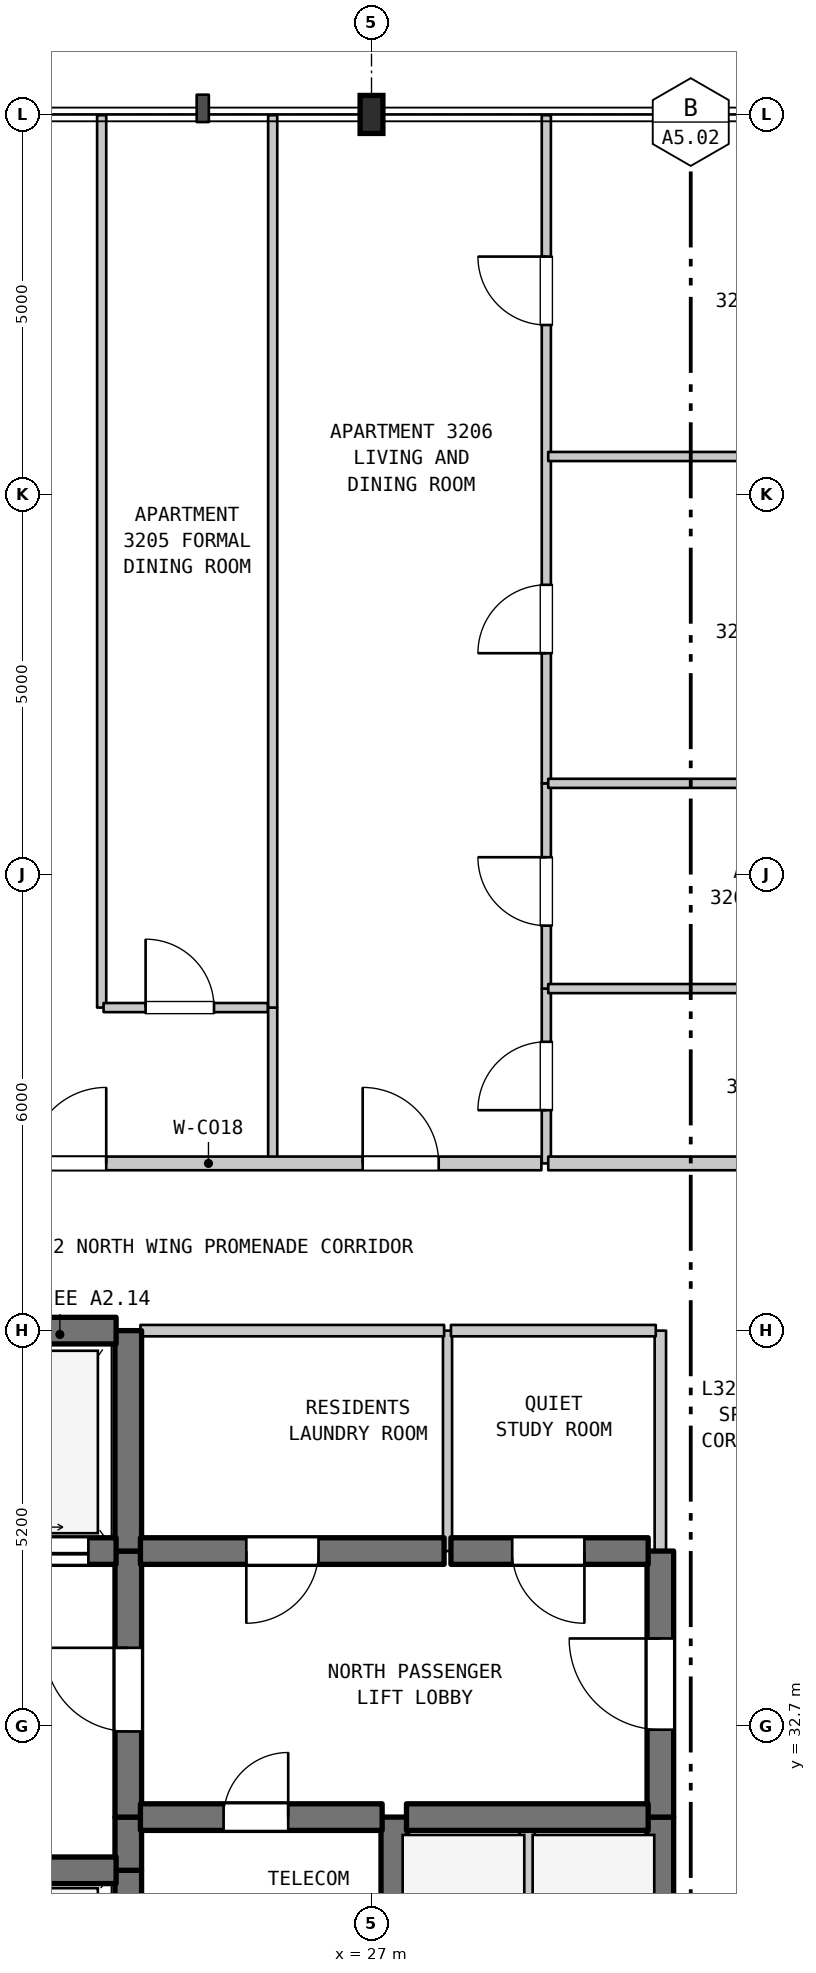
"""IFC4 building model, lengths in metres.
Left out: names, types, materials, properties, quantities, classifications, styles, units other than length and angle.
Written with IfcOpenShell. Run it as: python <this file> out.ifc"""

import sys

from ifc_helpers import new_model, si_unit, direction, frame, frame_2d, origin, origin_2d, place, context, subcontext, project, spatial, rectangle, i_section, extrude, element, fill, save


model = new_model("IFC4")
c1 = context("Model", 3, precision=1e-05, world=origin(), true_north=direction((0.0, 1.0)))
c2 = subcontext(c1, "Body", "Model", "MODEL_VIEW")
j1 = project(units=[si_unit("LENGTHUNIT", "METRE"), si_unit("PLANEANGLEUNIT", "RADIAN")], contexts=[c1])
p1 = place(None, origin())
s1 = spatial("IfcSite", under=j1, at=p1, CompositionType="ELEMENT")
p2 = place(p1, origin())
s2 = spatial("IfcBuilding", under=s1, at=p2, CompositionType="ELEMENT")
p3 = place(p2, frame((0.0, 0.0, 133.5)))
s3 = spatial("IfcBuildingStorey", under=s2, at=p3, CompositionType="ELEMENT", Elevation=133.5)
p4 = place(p3, frame((27.0, 53.9, 0.0), z_axis=(0.0, 0.0, 1.0), x_axis=(1.0, 0.0, 0.0)))
e1 = element("IfcColumn", 1, at=p4, inside=s3, PredefinedType="COLUMN", context=c2, shape_type="SweptSolid", body=[
    extrude(i_section(OverallWidth=0.3, OverallDepth=0.5, WebThickness=0.014, FlangeThickness=0.028, FilletRadius=0.027, at=origin_2d()), origin(), (0.0, 0.0, 1.0), 3.7),
])
p5 = place(p3, frame((23.45, 42.15, 0.0), z_axis=(0.0, 0.0, 1.0), x_axis=(0.0, 1.0, 0.0)))
e2 = element("IfcWall", 2, at=p5, inside=s3, PredefinedType="PARTITIONING", context=c2, shape_type="SweptSolid", body=[
    extrude(rectangle(XDim=11.74, YDim=0.12, at=frame_2d((5.87, 0.0))), origin(), (0.0, 0.0, 1.0), 3.385),
])
p6 = place(p3, frame((23.8, 29.5, 0.0), z_axis=(0.0, 0.0, 1.0), x_axis=(0.0, 1.0, 0.0)))
e3 = element("IfcWall", 3, at=p6, inside=s3, PredefinedType="SHEAR", context=c2, shape_type="SweptSolid", body=[
    extrude(rectangle(XDim=1.3, YDim=0.35, at=frame_2d((0.65, 0.0))), origin(), (0.0, 0.0, 1.0), 3.385),
])
p7 = place(p3, frame((23.8, 30.8, 0.0), z_axis=(0.0, 0.0, 1.0), x_axis=(0.0, 1.0, 0.0)))
e4 = element("IfcWall", 4, at=p7, inside=s3, PredefinedType="SHEAR", context=c2, shape_type="SweptSolid", body=[
    extrude(rectangle(XDim=0.7, YDim=0.35, at=frame_2d((0.35, 0.0))), origin(), (0.0, 0.0, 1.0), 3.385),
])
p8 = place(p3, frame((23.8, 31.5, 0.0), z_axis=(0.0, 0.0, 1.0), x_axis=(0.0, 1.0, 0.0)))
e5 = element("IfcWall", 5, at=p8, inside=s3, PredefinedType="SHEAR", context=c2, shape_type="SweptSolid", body=[
    extrude(rectangle(XDim=3.5, YDim=0.35, at=frame_2d((1.75, 0.0))), origin(), (0.0, 0.0, 1.0), 3.385),
])
p9 = place(p8, frame((1.127, 0.0, 0.0)))
e6 = element("IfcOpeningElement", 6, at=p9, cuts=e5, PredefinedType="OPENING", context=c2, shape_type="SweptSolid", body=[
    extrude(rectangle(XDim=1.1, YDim=2.15, at=frame_2d((0.55, 1.075))), frame((0.0, 0.185, 0.0), z_axis=(0.0, -1.0, 0.0), x_axis=(1.0, 0.0, 0.0)), (0.0, 0.0, 1.0), 0.37),
])
p10 = place(p3, frame((23.8, 35.0, 0.0), z_axis=(0.0, 0.0, 1.0), x_axis=(0.0, 1.0, 0.0)))
e7 = element("IfcWall", 7, at=p10, inside=s3, PredefinedType="SHEAR", context=c2, shape_type="SweptSolid", body=[
    extrude(rectangle(XDim=2.9, YDim=0.35, at=frame_2d((1.45, 0.0))), origin(), (0.0, 0.0, 1.0), 3.385),
])
p11 = place(p3, frame((25.7, 40.1, 0.0), z_axis=(0.0, 0.0, 1.0), x_axis=(0.0, 1.0, 0.0)))
e8 = element("IfcWall", 8, at=p11, inside=s3, PredefinedType="PARTITIONING", context=c2, shape_type="SweptSolid", body=[
    extrude(rectangle(XDim=2.05, YDim=0.12, at=frame_2d((1.025, 0.0))), origin(), (0.0, 0.0, 1.0), 3.385),
])
p12 = place(p3, frame((25.7, 42.15, 0.0), z_axis=(0.0, 0.0, 1.0), x_axis=(0.0, 1.0, 0.0)))
e9 = element("IfcWall", 9, at=p12, inside=s3, PredefinedType="PARTITIONING", context=c2, shape_type="SweptSolid", body=[
    extrude(rectangle(XDim=11.74, YDim=0.12, at=frame_2d((5.87, 0.0))), origin(), (0.0, 0.0, 1.0), 3.385),
])
p13 = place(p3, frame((27.3, 29.5, 0.0), z_axis=(0.0, 0.0, 1.0), x_axis=(0.0, 1.0, 0.0)))
e10 = element("IfcWall", 10, at=p13, inside=s3, PredefinedType="SHEAR", context=c2, shape_type="SweptSolid", body=[
    extrude(rectangle(XDim=2.0, YDim=0.35, at=frame_2d((1.0, 0.0))), origin(), (0.0, 0.0, 1.0), 3.385),
])
p14 = place(p3, frame((28.0, 35.0, 0.0), z_axis=(0.0, 0.0, 1.0), x_axis=(0.0, 1.0, 0.0)))
e11 = element("IfcWall", 11, at=p14, inside=s3, PredefinedType="PARTITIONING", context=c2, shape_type="SweptSolid", body=[
    extrude(rectangle(XDim=2.9, YDim=0.12, at=frame_2d((1.45, 0.0))), origin(), (0.0, 0.0, 1.0), 3.385),
])
p15 = place(p3, frame((29.05, 28.9, 0.0), z_axis=(0.0, 0.0, 1.0), x_axis=(0.0, 1.0, 0.0)))
e12 = element("IfcWall", 12, at=p15, inside=s3, PredefinedType="STANDARD", context=c2, shape_type="SweptSolid", body=[
    extrude(rectangle(XDim=2.6, YDim=0.2, at=frame_2d((1.3, 0.0))), origin(), (0.0, 0.0, 1.0), 3.385),
])
p16 = place(p3, frame((29.3, 40.1, 0.0), z_axis=(0.0, 0.0, 1.0), x_axis=(0.0, 1.0, 0.0)))
e13 = element("IfcWall", 13, at=p16, inside=s3, PredefinedType="PARTITIONING", context=c2, shape_type="SweptSolid", body=[
    extrude(rectangle(XDim=2.3, YDim=0.12, at=frame_2d((1.15, 0.0))), origin(), (0.0, 0.0, 1.0), 3.385),
])
p17 = place(p16, frame((0.7, 0.0, 0.0)))
e14 = element("IfcOpeningElement", 14, at=p17, cuts=e13, PredefinedType="OPENING", context=c2, shape_type="SweptSolid", body=[
    extrude(rectangle(XDim=0.9, YDim=2.15, at=frame_2d((0.45, 1.075))), frame((0.0, 0.07, 0.0), z_axis=(0.0, -1.0, 0.0), x_axis=(1.0, 0.0, 0.0)), (0.0, 0.0, 1.0), 0.14),
])
p18 = place(p3, frame((29.3, 42.4, 0.0), z_axis=(0.0, 0.0, 1.0), x_axis=(0.0, 1.0, 0.0)))
e15 = element("IfcWall", 15, at=p18, inside=s3, PredefinedType="PARTITIONING", context=c2, shape_type="SweptSolid", body=[
    extrude(rectangle(XDim=2.7, YDim=0.12, at=frame_2d((1.35, 0.0))), origin(), (0.0, 0.0, 1.0), 3.385),
])
p19 = place(p18, frame((0.828, 0.0, 0.0)))
e16 = element("IfcOpeningElement", 16, at=p19, cuts=e15, PredefinedType="OPENING", context=c2, shape_type="SweptSolid", body=[
    extrude(rectangle(XDim=0.9, YDim=2.1, at=frame_2d((0.45, 1.05))), frame((0.0, 0.07, 0.0), z_axis=(0.0, -1.0, 0.0), x_axis=(1.0, 0.0, 0.0)), (0.0, 0.0, 1.0), 0.14),
])
p20 = place(p3, frame((29.3, 45.1, 0.0), z_axis=(0.0, 0.0, 1.0), x_axis=(0.0, 1.0, 0.0)))
e17 = element("IfcWall", 17, at=p20, inside=s3, PredefinedType="PARTITIONING", context=c2, shape_type="SweptSolid", body=[
    extrude(rectangle(XDim=8.79, YDim=0.12, at=frame_2d((4.395, 0.0))), origin(), (0.0, 0.0, 1.0), 3.385),
])
p21 = place(p20, frame((1.712, 0.0, 0.0)))
e18 = element("IfcOpeningElement", 18, at=p21, cuts=e17, PredefinedType="OPENING", context=c2, shape_type="SweptSolid", body=[
    extrude(rectangle(XDim=0.9, YDim=2.15, at=frame_2d((0.45, 1.075))), frame((0.0, 0.07, 0.0), z_axis=(0.0, -1.0, 0.0), x_axis=(1.0, 0.0, 0.0)), (0.0, 0.0, 1.0), 0.14),
])
p22 = place(p20, frame((6.03, 0.0, 0.0)))
e19 = element("IfcOpeningElement", 19, at=p22, cuts=e17, PredefinedType="OPENING", context=c2, shape_type="SweptSolid", body=[
    extrude(rectangle(XDim=0.9, YDim=2.15, at=frame_2d((0.45, 1.075))), frame((0.0, 0.07, 0.0), z_axis=(0.0, -1.0, 0.0), x_axis=(1.0, 0.0, 0.0)), (0.0, 0.0, 1.0), 0.14),
])
p23 = place(p3, frame((30.8, 28.9, 0.0), z_axis=(0.0, 0.0, 1.0), x_axis=(0.0, 1.0, 0.0)))
e20 = element("IfcWall", 20, at=p23, inside=s3, PredefinedType="SHEAR", context=c2, shape_type="SweptSolid", body=[
    extrude(rectangle(XDim=2.6, YDim=0.35, at=frame_2d((1.3, 0.0))), origin(), (0.0, 0.0, 1.0), 3.385),
])
p24 = place(p3, frame((30.8, 31.5, 0.0), z_axis=(0.0, 0.0, 1.0), x_axis=(0.0, 1.0, 0.0)))
e21 = element("IfcWall", 21, at=p24, inside=s3, PredefinedType="SHEAR", context=c2, shape_type="SweptSolid", body=[
    extrude(rectangle(XDim=3.5, YDim=0.35, at=frame_2d((1.75, 0.0))), origin(), (0.0, 0.0, 1.0), 3.385),
])
p25 = place(p24, frame((1.15, 0.0, 0.0)))
e22 = element("IfcOpeningElement", 22, at=p25, cuts=e21, PredefinedType="OPENING", context=c2, shape_type="SweptSolid", body=[
    extrude(rectangle(XDim=1.2, YDim=2.2, at=frame_2d((0.6, 1.1))), frame((0.0, 0.185, 0.0), z_axis=(0.0, -1.0, 0.0), x_axis=(1.0, 0.0, 0.0)), (0.0, 0.0, 1.0), 0.37),
])
p26 = place(p3, frame((30.8, 35.0, 0.0), z_axis=(0.0, 0.0, 1.0), x_axis=(0.0, 1.0, 0.0)))
e23 = element("IfcWall", 23, at=p26, inside=s3, PredefinedType="STANDARD", context=c2, shape_type="SweptSolid", body=[
    extrude(rectangle(XDim=2.9, YDim=0.15, at=frame_2d((1.45, 0.0))), origin(), (0.0, 0.0, 1.0), 3.385),
])
p27 = place(p3, frame((19.16, 30.8, 0.0), z_axis=(0.0, 0.0, 1.0), x_axis=(1.0, 0.0, 0.0)))
e24 = element("IfcWall", 24, at=p27, inside=s3, PredefinedType="SHEAR", context=c2, shape_type="SweptSolid", body=[
    extrude(rectangle(XDim=4.48, YDim=0.35, at=frame_2d((2.24, 0.0))), origin(), (0.0, 0.0, 1.0), 3.385),
])
p28 = place(p3, frame((23.96, 31.5, 0.0), z_axis=(0.0, 0.0, 1.0), x_axis=(1.0, 0.0, 0.0)))
e25 = element("IfcWall", 25, at=p28, inside=s3, PredefinedType="SHEAR", context=c2, shape_type="SweptSolid", body=[
    extrude(rectangle(XDim=3.18, YDim=0.35, at=frame_2d((1.59, 0.0))), origin(), (0.0, 0.0, 1.0), 3.385),
])
p29 = place(p28, frame((1.094, 0.0, 0.0)))
e26 = element("IfcOpeningElement", 26, at=p29, cuts=e25, PredefinedType="OPENING", context=c2, shape_type="SweptSolid", body=[
    extrude(rectangle(XDim=0.85, YDim=2.1, at=frame_2d((0.425, 1.05))), frame((0.0, 0.185, 0.0), z_axis=(0.0, -1.0, 0.0), x_axis=(1.0, 0.0, 0.0)), (0.0, 0.0, 1.0), 0.37),
])
p30 = place(p3, frame((27.46, 31.5, 0.0), z_axis=(0.0, 0.0, 1.0), x_axis=(1.0, 0.0, 0.0)))
e27 = element("IfcWall", 27, at=p30, inside=s3, PredefinedType="SHEAR", context=c2, shape_type="SweptSolid", body=[
    extrude(rectangle(XDim=3.18, YDim=0.35, at=frame_2d((1.59, 0.0))), origin(), (0.0, 0.0, 1.0), 3.385),
])
p31 = place(p3, frame((19.16, 35.0, 0.0), z_axis=(0.0, 0.0, 1.0), x_axis=(1.0, 0.0, 0.0)))
e28 = element("IfcWall", 28, at=p31, inside=s3, PredefinedType="SHEAR", context=c2, shape_type="SweptSolid", body=[
    extrude(rectangle(XDim=4.48, YDim=0.35, at=frame_2d((2.24, 0.0))), origin(), (0.0, 0.0, 1.0), 3.385),
])
p32 = place(p31, frame((0.365, 0.0, 0.0)))
e29 = element("IfcOpeningElement", 29, at=p32, cuts=e28, PredefinedType="OPENING", context=c2, shape_type="SweptSolid", body=[
    extrude(rectangle(XDim=1.35, YDim=2.2, at=frame_2d((0.675, 1.1))), frame((0.0, 0.185, 0.0), z_axis=(0.0, -1.0, 0.0), x_axis=(1.0, 0.0, 0.0)), (0.0, 0.0, 1.0), 0.37),
])
p33 = place(p31, frame((2.765, 0.0, 0.0)))
e30 = element("IfcOpeningElement", 30, at=p33, cuts=e28, PredefinedType="OPENING", context=c2, shape_type="SweptSolid", body=[
    extrude(rectangle(XDim=1.35, YDim=2.2, at=frame_2d((0.675, 1.1))), frame((0.0, 0.185, 0.0), z_axis=(0.0, -1.0, 0.0), x_axis=(1.0, 0.0, 0.0)), (0.0, 0.0, 1.0), 0.37),
])
p34 = place(p3, frame((23.96, 35.0, 0.0), z_axis=(0.0, 0.0, 1.0), x_axis=(1.0, 0.0, 0.0)))
e31 = element("IfcWall", 31, at=p34, inside=s3, PredefinedType="SHEAR", context=c2, shape_type="SweptSolid", body=[
    extrude(rectangle(XDim=3.995, YDim=0.35, at=frame_2d((1.998, 0.0))), origin(), (0.0, 0.0, 1.0), 3.385),
])
p35 = place(p34, frame((1.393, 0.0, 0.0)))
e32 = element("IfcOpeningElement", 32, at=p35, cuts=e31, PredefinedType="OPENING", context=c2, shape_type="SweptSolid", body=[
    extrude(rectangle(XDim=0.95, YDim=2.15, at=frame_2d((0.475, 1.075))), frame((0.0, 0.185, 0.0), z_axis=(0.0, -1.0, 0.0), x_axis=(1.0, 0.0, 0.0)), (0.0, 0.0, 1.0), 0.37),
])
p36 = place(p3, frame((28.045, 35.0, 0.0), z_axis=(0.0, 0.0, 1.0), x_axis=(1.0, 0.0, 0.0)))
e33 = element("IfcWall", 33, at=p36, inside=s3, PredefinedType="SHEAR", context=c2, shape_type="SweptSolid", body=[
    extrude(rectangle(XDim=2.595, YDim=0.35, at=frame_2d((1.297, 0.0))), origin(), (0.0, 0.0, 1.0), 3.385),
])
p37 = place(p36, frame((0.806, 0.0, 0.0)))
e34 = element("IfcOpeningElement", 34, at=p37, cuts=e33, PredefinedType="OPENING", context=c2, shape_type="SweptSolid", body=[
    extrude(rectangle(XDim=0.95, YDim=2.15, at=frame_2d((0.475, 1.075))), frame((0.0, 0.185, 0.0), z_axis=(0.0, -1.0, 0.0), x_axis=(1.0, 0.0, 0.0)), (0.0, 0.0, 1.0), 0.37),
])
p38 = place(p3, frame((19.16, 37.9, 0.0), z_axis=(0.0, 0.0, 1.0), x_axis=(1.0, 0.0, 0.0)))
e35 = element("IfcWall", 35, at=p38, inside=s3, PredefinedType="SHEAR", context=c2, shape_type="SweptSolid", body=[
    extrude(rectangle(XDim=4.48, YDim=0.35, at=frame_2d((2.24, 0.0))), origin(), (0.0, 0.0, 1.0), 3.385),
])
p39 = place(p3, frame((23.96, 37.9, 0.0), z_axis=(0.0, 0.0, 1.0), x_axis=(1.0, 0.0, 0.0)))
e36 = element("IfcWall", 36, at=p39, inside=s3, PredefinedType="STANDARD", context=c2, shape_type="SweptSolid", body=[
    extrude(rectangle(XDim=3.995, YDim=0.15, at=frame_2d((1.998, 0.0))), origin(), (0.0, 0.0, 1.0), 2.885),
])
p40 = place(p3, frame((28.045, 37.9, 0.0), z_axis=(0.0, 0.0, 1.0), x_axis=(1.0, 0.0, 0.0)))
e37 = element("IfcWall", 37, at=p40, inside=s3, PredefinedType="STANDARD", context=c2, shape_type="SweptSolid", body=[
    extrude(rectangle(XDim=2.695, YDim=0.15, at=frame_2d((1.348, 0.0))), origin(), (0.0, 0.0, 1.0), 2.885),
])
p41 = place(p3, frame((20.475, 40.1, 0.0), z_axis=(0.0, 0.0, 1.0), x_axis=(1.0, 0.0, 0.0)))
e38 = element("IfcWall", 38, at=p41, inside=s3, PredefinedType="STANDARD", context=c2, shape_type="SweptSolid", body=[
    extrude(rectangle(XDim=8.76, YDim=0.18, at=frame_2d((4.38, 0.0))), origin(), (0.0, 0.0, 1.0), 3.385),
])
p42 = place(p41, frame((2.035, 0.0, 0.0)))
e39 = element("IfcOpeningElement", 39, at=p42, cuts=e38, PredefinedType="OPENING", context=c2, shape_type="SweptSolid", body=[
    extrude(rectangle(XDim=1.0, YDim=2.15, at=frame_2d((0.5, 1.075))), frame((0.0, 0.1, 0.0), z_axis=(0.0, -1.0, 0.0), x_axis=(1.0, 0.0, 0.0)), (0.0, 0.0, 1.0), 0.2),
])
p43 = place(p41, frame((6.409, 0.0, 0.0)))
e40 = element("IfcOpeningElement", 40, at=p43, cuts=e38, PredefinedType="OPENING", context=c2, shape_type="SweptSolid", body=[
    extrude(rectangle(XDim=1.0, YDim=2.15, at=frame_2d((0.5, 1.075))), frame((0.0, 0.1, 0.0), z_axis=(0.0, -1.0, 0.0), x_axis=(1.0, 0.0, 0.0)), (0.0, 0.0, 1.0), 0.2),
])
p44 = place(p3, frame((29.325, 40.1, 0.0), z_axis=(0.0, 0.0, 1.0), x_axis=(1.0, 0.0, 0.0)))
e41 = element("IfcWall", 41, at=p44, inside=s3, PredefinedType="STANDARD", context=c2, shape_type="SweptSolid", body=[
    extrude(rectangle(XDim=6.02, YDim=0.18, at=frame_2d((3.01, 0.0))), origin(), (0.0, 0.0, 1.0), 3.385),
])
p45 = place(p3, frame((23.475, 42.15, 0.0), z_axis=(0.0, 0.0, 1.0), x_axis=(1.0, 0.0, 0.0)))
e42 = element("IfcWall", 42, at=p45, inside=s3, PredefinedType="PARTITIONING", context=c2, shape_type="SweptSolid", body=[
    extrude(rectangle(XDim=2.16, YDim=0.12, at=frame_2d((1.08, 0.0))), origin(), (0.0, 0.0, 1.0), 3.385),
])
p46 = place(p45, frame((0.553, 0.0, 0.0)))
e43 = element("IfcOpeningElement", 43, at=p46, cuts=e42, PredefinedType="OPENING", context=c2, shape_type="SweptSolid", body=[
    extrude(rectangle(XDim=0.9, YDim=2.15, at=frame_2d((0.45, 1.075))), frame((0.0, 0.07, 0.0), z_axis=(0.0, -1.0, 0.0), x_axis=(1.0, 0.0, 0.0)), (0.0, 0.0, 1.0), 0.14),
])
for number, where, z_axis, x_axis in (
    (44, (29.325, 42.4, 0.0), (0.0, 0.0, 1.0), (1.0, 0.0, 0.0)),
    (45, (29.325, 45.1, 0.0), (0.0, 0.0, 1.0), (1.0, 0.0, 0.0)),
    (46, (29.325, 49.4, 0.0), (0.0, 0.0, 1.0), (1.0, 0.0, 0.0)),
):
    element("IfcWall", number, at=place(p3, frame(where, z_axis=z_axis, x_axis=x_axis)), inside=s3, PredefinedType="PARTITIONING", context=c2, shape_type="SweptSolid", body=[
        extrude(rectangle(XDim=6.02, YDim=0.12, at=frame_2d((3.01, 0.0))), origin(), (0.0, 0.0, 1.0), 3.385),
    ])
p47 = place(p9, origin())
e47 = element("IfcDoor", 47, at=p47, inside=s3, OperationType="SINGLE_SWING_RIGHT", PredefinedType="DOOR", context=c2, shape_type="SweptSolid", body=[
    extrude(rectangle(XDim=1.1, YDim=2.15, at=frame_2d((0.55, 1.075))), frame((0.0, 0.025, 0.0), z_axis=(0.0, -1.0, 0.0), x_axis=(1.0, 0.0, 0.0)), (0.0, 0.0, 1.0), 0.05),
])
fill(e6, e47)
p48 = place(p17, origin())
e48 = element("IfcDoor", 48, at=p48, inside=s3, OperationType="SINGLE_SWING_LEFT", PredefinedType="DOOR", context=c2, shape_type="SweptSolid", body=[
    extrude(rectangle(XDim=0.9, YDim=2.15, at=frame_2d((0.45, 1.075))), frame((0.0, 0.025, 0.0), z_axis=(0.0, -1.0, 0.0), x_axis=(1.0, 0.0, 0.0)), (0.0, 0.0, 1.0), 0.05),
])
fill(e14, e48)
p49 = place(p19, origin())
e49 = element("IfcDoor", 49, at=p49, inside=s3, OperationType="SINGLE_SWING_RIGHT", PredefinedType="DOOR", context=c2, shape_type="SweptSolid", body=[
    extrude(rectangle(XDim=0.9, YDim=2.1, at=frame_2d((0.45, 1.05))), frame((0.0, 0.025, 0.0), z_axis=(0.0, -1.0, 0.0), x_axis=(1.0, 0.0, 0.0)), (0.0, 0.0, 1.0), 0.05),
])
fill(e16, e49)
p50 = place(p21, origin())
e50 = element("IfcDoor", 50, at=p50, inside=s3, OperationType="SINGLE_SWING_LEFT", PredefinedType="DOOR", context=c2, shape_type="SweptSolid", body=[
    extrude(rectangle(XDim=0.9, YDim=2.15, at=frame_2d((0.45, 1.075))), frame((0.0, 0.025, 0.0), z_axis=(0.0, -1.0, 0.0), x_axis=(1.0, 0.0, 0.0)), (0.0, 0.0, 1.0), 0.05),
])
fill(e18, e50)
p51 = place(p22, origin())
e51 = element("IfcDoor", 51, at=p51, inside=s3, OperationType="SINGLE_SWING_RIGHT", PredefinedType="DOOR", context=c2, shape_type="SweptSolid", body=[
    extrude(rectangle(XDim=0.9, YDim=2.15, at=frame_2d((0.45, 1.075))), frame((0.0, 0.025, 0.0), z_axis=(0.0, -1.0, 0.0), x_axis=(1.0, 0.0, 0.0)), (0.0, 0.0, 1.0), 0.05),
])
fill(e19, e51)
p52 = place(p25, origin())
e52 = element("IfcDoor", 52, at=p52, inside=s3, OperationType="SINGLE_SWING_RIGHT", PredefinedType="DOOR", context=c2, shape_type="SweptSolid", body=[
    extrude(rectangle(XDim=1.2, YDim=2.2, at=frame_2d((0.6, 1.1))), frame((0.0, 0.025, 0.0), z_axis=(0.0, -1.0, 0.0), x_axis=(1.0, 0.0, 0.0)), (0.0, 0.0, 1.0), 0.05),
])
fill(e22, e52)
p53 = place(p29, origin())
e53 = element("IfcDoor", 53, at=p53, inside=s3, OperationType="SINGLE_SWING_RIGHT", PredefinedType="DOOR", context=c2, shape_type="SweptSolid", body=[
    extrude(rectangle(XDim=0.85, YDim=2.1, at=frame_2d((0.425, 1.05))), frame((0.0, 0.025, 0.0), z_axis=(0.0, -1.0, 0.0), x_axis=(1.0, 0.0, 0.0)), (0.0, 0.0, 1.0), 0.05),
])
fill(e26, e53)
p54 = place(p33, origin())
e54 = element("IfcDoor", 54, at=p54, inside=s3, OperationType="DOUBLE_DOOR_SLIDING", PredefinedType="DOOR", context=c2, shape_type="SweptSolid", body=[
    extrude(rectangle(XDim=1.35, YDim=2.2, at=frame_2d((0.675, 1.1))), frame((0.0, 0.025, 0.0), z_axis=(0.0, -1.0, 0.0), x_axis=(1.0, 0.0, 0.0)), (0.0, 0.0, 1.0), 0.05),
])
fill(e30, e54)
p55 = place(p35, frame((0.95, 0.0, 0.0), z_axis=(0.0, 0.0, 1.0), x_axis=(-1.0, 0.0, 0.0)))
e55 = element("IfcDoor", 55, at=p55, inside=s3, OperationType="SINGLE_SWING_LEFT", PredefinedType="DOOR", context=c2, shape_type="SweptSolid", body=[
    extrude(rectangle(XDim=0.95, YDim=2.15, at=frame_2d((0.475, 1.075))), frame((0.0, 0.025, 0.0), z_axis=(0.0, -1.0, 0.0), x_axis=(1.0, 0.0, 0.0)), (0.0, 0.0, 1.0), 0.05),
])
fill(e32, e55)
p56 = place(p37, frame((0.95, 0.0, 0.0), z_axis=(0.0, 0.0, 1.0), x_axis=(-1.0, 0.0, 0.0)))
e56 = element("IfcDoor", 56, at=p56, inside=s3, OperationType="SINGLE_SWING_RIGHT", PredefinedType="DOOR", context=c2, shape_type="SweptSolid", body=[
    extrude(rectangle(XDim=0.95, YDim=2.15, at=frame_2d((0.475, 1.075))), frame((0.0, 0.025, 0.0), z_axis=(0.0, -1.0, 0.0), x_axis=(1.0, 0.0, 0.0)), (0.0, 0.0, 1.0), 0.05),
])
fill(e34, e56)
p57 = place(p42, origin())
e57 = element("IfcDoor", 57, at=p57, inside=s3, OperationType="SINGLE_SWING_RIGHT", PredefinedType="DOOR", context=c2, shape_type="SweptSolid", body=[
    extrude(rectangle(XDim=1.0, YDim=2.15, at=frame_2d((0.5, 1.075))), frame((0.0, 0.025, 0.0), z_axis=(0.0, -1.0, 0.0), x_axis=(1.0, 0.0, 0.0)), (0.0, 0.0, 1.0), 0.05),
])
fill(e39, e57)
p58 = place(p43, origin())
e58 = element("IfcDoor", 58, at=p58, inside=s3, OperationType="SINGLE_SWING_LEFT", PredefinedType="DOOR", context=c2, shape_type="SweptSolid", body=[
    extrude(rectangle(XDim=1.0, YDim=2.15, at=frame_2d((0.5, 1.075))), frame((0.0, 0.025, 0.0), z_axis=(0.0, -1.0, 0.0), x_axis=(1.0, 0.0, 0.0)), (0.0, 0.0, 1.0), 0.05),
])
fill(e40, e58)
p59 = place(p46, origin())
e59 = element("IfcDoor", 59, at=p59, inside=s3, OperationType="SINGLE_SWING_LEFT", PredefinedType="DOOR", context=c2, shape_type="SweptSolid", body=[
    extrude(rectangle(XDim=0.9, YDim=2.15, at=frame_2d((0.45, 1.075))), frame((0.0, 0.025, 0.0), z_axis=(0.0, -1.0, 0.0), x_axis=(1.0, 0.0, 0.0)), (0.0, 0.0, 1.0), 0.05),
])
fill(e43, e59)
save(model, sys.argv[1])
